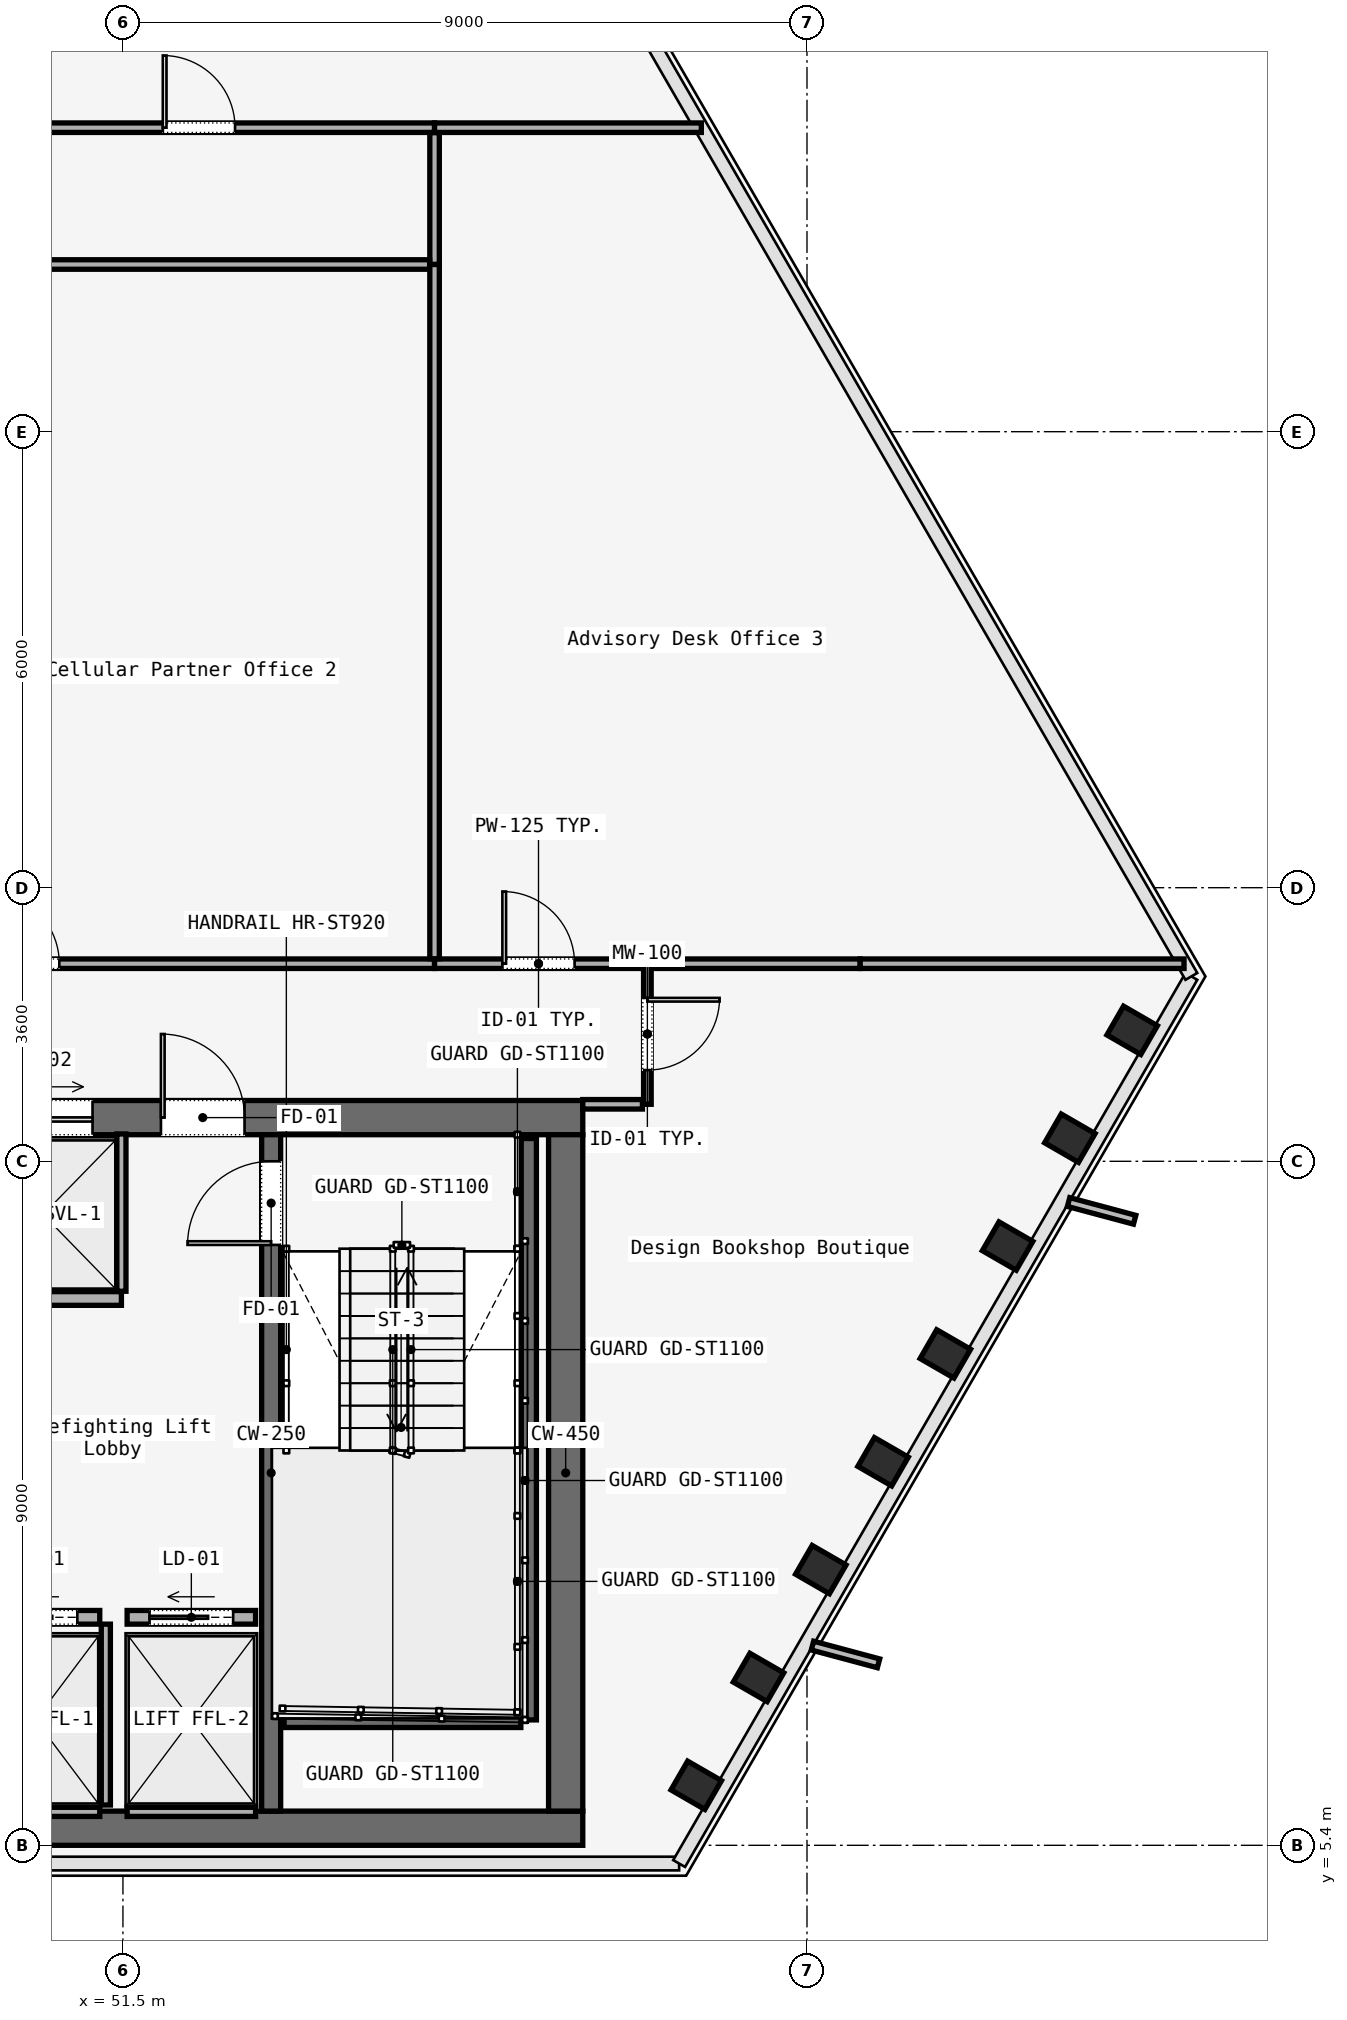
"""IFC4 building model, lengths in metres.
Left out: names, types, materials, properties, quantities, classifications, styles, units other than length and angle.
Written with IfcOpenShell. Run it as: python <this file> out.ifc"""

import sys

from ifc_helpers import new_model, si_unit, direction, frame, frame_2d, origin, origin_2d, place, context, subcontext, project, spatial, rectangle, i_section, extrude, element, fill, save


model = new_model("IFC4")
c1 = context("Model", 3, precision=1e-05, world=origin(), true_north=direction((0.0, 1.0)))
c2 = subcontext(c1, "Body", "Model", "MODEL_VIEW")
j1 = project(units=[si_unit("LENGTHUNIT", "METRE"), si_unit("PLANEANGLEUNIT", "RADIAN")], contexts=[c1])
p1 = place(None, origin())
s1 = spatial("IfcSite", under=j1, at=p1, CompositionType="ELEMENT")
p2 = place(p1, origin())
s2 = spatial("IfcBuilding", under=s1, at=p2, CompositionType="ELEMENT")
p3 = place(p2, frame((0.0, 0.0, 104.4)))
s3 = spatial("IfcBuildingStorey", under=s2, at=p3, CompositionType="ELEMENT", Elevation=104.4)
p4 = place(p3, frame((26.45, 14.975, 0.0), z_axis=(0.0, 0.0, 1.0), x_axis=(1.0, 0.0, 0.0)))
e1 = element("IfcWall", 1, at=p4, inside=s3, PredefinedType="SOLIDWALL", context=c2, shape_type="SweptSolid", body=[
    extrude(rectangle(XDim=31.1, YDim=0.45, at=frame_2d((15.55, 0.0))), origin(), (0.0, 0.0, 1.0), 3.58),
])
p5 = place(p4, frame((1.65, 0.0, 0.0)))
e2 = element("IfcOpeningElement", 2, at=p5, cuts=e1, PredefinedType="OPENING", context=c2, shape_type="SweptSolid", body=[
    extrude(rectangle(XDim=1.1, YDim=2.2, at=frame_2d((0.55, 1.1))), frame((0.0, 0.225, 0.0), z_axis=(0.0, -1.0, 0.0), x_axis=(1.0, 0.0, 0.0)), (0.0, 0.0, 1.0), 0.45),
])
p6 = place(p4, frame((13.65, 0.0, 0.0)))
e3 = element("IfcOpeningElement", 3, at=p6, cuts=e1, PredefinedType="OPENING", context=c2, shape_type="SweptSolid", body=[
    extrude(rectangle(XDim=1.1, YDim=2.2, at=frame_2d((0.55, 1.1))), frame((0.0, 0.225, 0.0), z_axis=(0.0, -1.0, 0.0), x_axis=(1.0, 0.0, 0.0)), (0.0, 0.0, 1.0), 0.45),
])
p7 = place(p4, frame((25.55, 0.0, 0.0)))
e4 = element("IfcOpeningElement", 4, at=p7, cuts=e1, PredefinedType="OPENING", context=c2, shape_type="SweptSolid", body=[
    extrude(rectangle(XDim=1.1, YDim=2.2, at=frame_2d((0.55, 1.1))), frame((0.0, 0.225, 0.0), z_axis=(0.0, -1.0, 0.0), x_axis=(1.0, 0.0, 0.0)), (0.0, 0.0, 1.0), 0.45),
])
p8 = place(p4, frame((10.7, 0.0, 0.0)))
e5 = element("IfcOpeningElement", 5, at=p8, cuts=e1, PredefinedType="OPENING", context=c2, shape_type="SweptSolid", body=[
    extrude(rectangle(XDim=1.4, YDim=2.2, at=frame_2d((0.7, 1.1))), frame((0.0, 0.225, 0.0), z_axis=(0.0, -1.0, 0.0), x_axis=(1.0, 0.0, 0.0)), (0.0, 0.0, 1.0), 0.45),
])
p9 = place(p4, frame((19.35, 0.0, 0.0)))
e6 = element("IfcOpeningElement", 6, at=p9, cuts=e1, PredefinedType="OPENING", context=c2, shape_type="SweptSolid", body=[
    extrude(rectangle(XDim=1.1, YDim=2.2, at=frame_2d((0.55, 1.1))), frame((0.0, 0.225, 0.0), z_axis=(0.0, -1.0, 0.0), x_axis=(1.0, 0.0, 0.0)), (0.0, 0.0, 1.0), 0.45),
])
p10 = place(p4, frame((21.4, 0.0, 0.0)))
e7 = element("IfcOpeningElement", 7, at=p10, cuts=e1, PredefinedType="OPENING", context=c2, shape_type="SweptSolid", body=[
    extrude(rectangle(XDim=0.9, YDim=2.1, at=frame_2d((0.45, 1.05))), frame((0.0, 0.225, 0.0), z_axis=(0.0, -1.0, 0.0), x_axis=(1.0, 0.0, 0.0)), (0.0, 0.0, 1.0), 0.45),
])
p11 = place(p4, frame((23.35, 0.0, 0.0)))
e8 = element("IfcOpeningElement", 8, at=p11, cuts=e1, PredefinedType="OPENING", context=c2, shape_type="SweptSolid", body=[
    extrude(rectangle(XDim=1.3, YDim=2.3, at=frame_2d((0.65, 1.15))), frame((0.0, 0.225, 0.0), z_axis=(0.0, -1.0, 0.0), x_axis=(1.0, 0.0, 0.0)), (0.0, 0.0, 1.0), 0.45),
])
p12 = place(p3, frame((26.45, 5.625, 0.0), z_axis=(0.0, 0.0, 1.0), x_axis=(1.0, 0.0, 0.0)))
e9 = element("IfcWall", 9, at=p12, inside=s3, PredefinedType="SOLIDWALL", context=c2, shape_type="SweptSolid", body=[
    extrude(rectangle(XDim=31.1, YDim=0.45, at=frame_2d((15.55, 0.0))), origin(), (0.0, 0.0, 1.0), 3.58),
])
p13 = place(p3, frame((57.325, 5.85, 0.0), z_axis=(0.0, 0.0, 1.0), x_axis=(0.0, 1.0, 0.0)))
e10 = element("IfcWall", 10, at=p13, inside=s3, PredefinedType="SOLIDWALL", context=c2, shape_type="SweptSolid", body=[
    extrude(rectangle(XDim=8.9, YDim=0.45, at=frame_2d((4.45, 0.0))), origin(), (0.0, 0.0, 1.0), 3.58),
])
p14 = place(p3, frame((53.45, 5.85, 0.0), z_axis=(0.0, 0.0, 1.0), x_axis=(0.0, 1.0, 0.0)))
e11 = element("IfcWall", 11, at=p14, inside=s3, PredefinedType="SOLIDWALL", context=c2, shape_type="SweptSolid", body=[
    extrude(rectangle(XDim=8.9, YDim=0.25, at=frame_2d((4.45, 0.0))), origin(), (0.0, 0.0, 1.0), 3.58),
])
p15 = place(p14, frame((7.45, 0.0, 0.0)))
e12 = element("IfcOpeningElement", 12, at=p15, cuts=e11, PredefinedType="OPENING", context=c2, shape_type="SweptSolid", body=[
    extrude(rectangle(XDim=1.1, YDim=2.2, at=frame_2d((0.55, 1.1))), frame((0.0, 0.125, 0.0), z_axis=(0.0, -1.0, 0.0), x_axis=(1.0, 0.0, 0.0)), (0.0, 0.0, 1.0), 0.25),
])
for number, where, z_axis, x_axis in (
    (13, (59.043, 6.19, 0.0), (0.0, 0.0, 1.0), (0.5, 0.866, 0.0)),
    (14, (59.862, 7.609, 0.0), (0.0, 0.0, 1.0), (0.5, 0.866, 0.0)),
    (15, (60.682, 9.028, 0.0), (0.0, 0.0, 1.0), (0.5, 0.866, 0.0)),
    (16, (61.501, 10.447, 0.0), (0.0, 0.0, 1.0), (0.5, 0.866, 0.0)),
    (17, (62.32, 11.866, 0.0), (0.0, 0.0, 1.0), (0.5, 0.866, 0.0)),
    (18, (63.139, 13.285, 0.0), (0.0, 0.0, 1.0), (0.5, 0.866, 0.0)),
    (19, (63.959, 14.704, 0.0), (0.0, 0.0, 1.0), (0.5, 0.866, 0.0)),
    (20, (64.778, 16.123, 0.0), (0.0, 0.0, 1.0), (0.5, 0.866, 0.0)),
):
    element("IfcColumn", number, at=place(p3, frame(where, z_axis=z_axis, x_axis=x_axis)), inside=s3, PredefinedType="COLUMN", context=c2, shape_type="SweptSolid", body=[
        extrude(i_section(OverallWidth=0.437, OverallDepth=0.514, WebThickness=0.061, FlangeThickness=0.077, FilletRadius=0.015, at=origin_2d()), origin(), (0.0, 0.0, 1.0), 3.58),
    ])
p16 = place(p3, frame((56.84, 14.7, 0.0), z_axis=(0.0, 0.0, 1.0), x_axis=(0.0, -1.0, 0.0)))
e21 = element("IfcWall", 21, at=p16, inside=s3, PredefinedType="SOLIDWALL", context=c2, shape_type="SweptSolid", body=[
    extrude(rectangle(XDim=7.65, YDim=0.2, at=frame_2d((3.825, 0.0))), origin(), (0.0, 0.0, 1.0), 3.8),
])
p17 = place(p3, frame((53.62, 7.05, 0.0), z_axis=(0.0, 0.0, 1.0), x_axis=(1.0, 0.0, 0.0)))
e22 = element("IfcWall", 22, at=p17, inside=s3, PredefinedType="SOLIDWALL", context=c2, shape_type="SweptSolid", body=[
    extrude(rectangle(XDim=3.115, YDim=0.2, at=frame_2d((1.558, 0.0))), origin(), (0.0, 0.0, 1.0), 3.8),
])
p18 = place(p3, frame((49.505, 8.4, 0.0), z_axis=(0.0, 0.0, 1.0), x_axis=(1.0, 0.0, 0.0)))
e23 = element("IfcWall", 23, at=p18, inside=s3, PredefinedType="SOLIDWALL", context=c2, shape_type="SweptSolid", body=[
    extrude(rectangle(XDim=1.69, YDim=0.18, at=frame_2d((0.845, 0.0))), origin(), (0.0, 0.0, 1.0), 2.95),
])
p19 = place(p18, frame((0.295, 0.0, 0.0)))
e24 = element("IfcOpeningElement", 24, at=p19, cuts=e23, PredefinedType="OPENING", context=c2, shape_type="SweptSolid", body=[
    extrude(rectangle(XDim=1.1, YDim=2.2, at=frame_2d((0.55, 1.1))), frame((0.0, 0.09, 0.0), z_axis=(0.0, -1.0, 0.0), x_axis=(1.0, 0.0, 0.0)), (0.0, 0.0, 1.0), 0.18),
])
p20 = place(p3, frame((49.505, 5.84, 0.0), z_axis=(0.0, 0.0, 1.0), x_axis=(1.0, 0.0, 0.0)))
e25 = element("IfcWall", 25, at=p20, inside=s3, PredefinedType="SOLIDWALL", context=c2, shape_type="SweptSolid", body=[
    extrude(rectangle(XDim=1.69, YDim=0.12, at=frame_2d((0.845, 0.0))), origin(), (0.0, 0.0, 1.0), 2.95),
])
p21 = place(p3, frame((51.275, 5.93, 0.0), z_axis=(0.0, 0.0, 1.0), x_axis=(0.0, 1.0, 0.0)))
e26 = element("IfcWall", 26, at=p21, inside=s3, PredefinedType="SOLIDWALL", context=c2, shape_type="SweptSolid", body=[
    extrude(rectangle(XDim=2.38, YDim=0.12, at=frame_2d((1.19, 0.0))), origin(), (0.0, 0.0, 1.0), 2.95),
])
p22 = place(p3, frame((51.555, 8.4, 0.0), z_axis=(0.0, 0.0, 1.0), x_axis=(1.0, 0.0, 0.0)))
e27 = element("IfcWall", 27, at=p22, inside=s3, PredefinedType="SOLIDWALL", context=c2, shape_type="SweptSolid", body=[
    extrude(rectangle(XDim=1.69, YDim=0.18, at=frame_2d((0.845, 0.0))), origin(), (0.0, 0.0, 1.0), 2.95),
])
p23 = place(p22, frame((0.295, 0.0, 0.0)))
e28 = element("IfcOpeningElement", 28, at=p23, cuts=e27, PredefinedType="OPENING", context=c2, shape_type="SweptSolid", body=[
    extrude(rectangle(XDim=1.1, YDim=2.2, at=frame_2d((0.55, 1.1))), frame((0.0, 0.09, 0.0), z_axis=(0.0, -1.0, 0.0), x_axis=(1.0, 0.0, 0.0)), (0.0, 0.0, 1.0), 0.18),
])
p24 = place(p3, frame((51.555, 5.84, 0.0), z_axis=(0.0, 0.0, 1.0), x_axis=(1.0, 0.0, 0.0)))
e29 = element("IfcWall", 29, at=p24, inside=s3, PredefinedType="SOLIDWALL", context=c2, shape_type="SweptSolid", body=[
    extrude(rectangle(XDim=1.69, YDim=0.12, at=frame_2d((0.845, 0.0))), origin(), (0.0, 0.0, 1.0), 2.95),
])
p25 = place(p3, frame((49.44, 12.595, 0.0), z_axis=(0.0, 0.0, 1.0), x_axis=(1.0, 0.0, 0.0)))
e30 = element("IfcWall", 30, at=p25, inside=s3, PredefinedType="SOLIDWALL", context=c2, shape_type="SweptSolid", body=[
    extrude(rectangle(XDim=2.04, YDim=0.18, at=frame_2d((1.02, 0.0))), origin(), (0.0, 0.0, 1.0), 2.95),
])
p26 = place(p3, frame((51.48, 12.69, 0.0), z_axis=(0.0, 0.0, 1.0), x_axis=(0.0, 1.0, 0.0)))
e31 = element("IfcWall", 31, at=p26, inside=s3, PredefinedType="SOLIDWALL", context=c2, shape_type="SweptSolid", body=[
    extrude(rectangle(XDim=2.07, YDim=0.12, at=frame_2d((1.035, 0.0))), origin(), (0.0, 0.0, 1.0), 2.95),
])
p27 = place(p3, frame((58.4, 17.0, 0.0), z_axis=(0.0, 0.0, 1.0), x_axis=(0.0, -1.0, 0.0)))
e32 = element("IfcWall", 32, at=p27, inside=s3, PredefinedType="MOVABLE", context=c2, shape_type="SweptSolid", body=[
    extrude(rectangle(XDim=1.85, YDim=0.1, at=frame_2d((0.925, 0.0))), origin(), (0.0, 0.0, 1.0), 2.95),
])
p28 = place(p27, frame((0.45, 0.0, 0.0)))
e33 = element("IfcOpeningElement", 33, at=p28, cuts=e32, PredefinedType="OPENING", context=c2, shape_type="SweptSolid", body=[
    extrude(rectangle(XDim=0.95, YDim=2.2, at=frame_2d((0.475, 1.1))), frame((0.0, 0.05, 0.0), z_axis=(0.0, -1.0, 0.0), x_axis=(1.0, 0.0, 0.0)), (0.0, 0.0, 1.0), 0.1),
])
p29 = place(p3, frame((58.335, 15.15, 0.0), z_axis=(0.0, 0.0, 1.0), x_axis=(-1.0, 0.0, 0.0)))
e34 = element("IfcWall", 34, at=p29, inside=s3, PredefinedType="PARTITIONING", context=c2, shape_type="SweptSolid", body=[
    extrude(rectangle(XDim=0.785, YDim=0.125, at=frame_2d((0.393, 0.0))), origin(), (0.0, 0.0, 1.0), 2.95),
])
p30 = place(p3, frame((49.4, 28.0, 0.0), z_axis=(0.0, 0.0, 1.0), x_axis=(1.0, 0.0, 0.0)))
e35 = element("IfcWall", 35, at=p30, inside=s3, PredefinedType="PARTITIONING", context=c2, shape_type="SweptSolid", body=[
    extrude(rectangle(XDim=6.2, YDim=0.125, at=frame_2d((3.1, 0.0))), origin(), (0.0, 0.0, 1.0), 2.95),
])
p31 = place(p30, frame((2.625, 0.0, 0.0)))
e36 = element("IfcOpeningElement", 36, at=p31, cuts=e35, PredefinedType="OPENING", context=c2, shape_type="SweptSolid", body=[
    extrude(rectangle(XDim=0.95, YDim=2.2, at=frame_2d((0.475, 1.1))), frame((0.0, 0.062, 0.0), z_axis=(0.0, -1.0, 0.0), x_axis=(1.0, 0.0, 0.0)), (0.0, 0.0, 1.0), 0.125),
])
p32 = place(p3, frame((55.6, 27.935, 0.0), z_axis=(0.0, 0.0, 1.0), x_axis=(0.0, -1.0, 0.0)))
e37 = element("IfcWall", 37, at=p32, inside=s3, PredefinedType="PARTITIONING", context=c2, shape_type="SweptSolid", body=[
    extrude(rectangle(XDim=1.735, YDim=0.125, at=frame_2d((0.868, 0.0))), origin(), (0.0, 0.0, 1.0), 2.95),
])
p33 = place(p3, frame((55.535, 26.2, 0.0), z_axis=(0.0, 0.0, 1.0), x_axis=(-1.0, 0.0, 0.0)))
e38 = element("IfcWall", 38, at=p33, inside=s3, PredefinedType="PARTITIONING", context=c2, shape_type="SweptSolid", body=[
    extrude(rectangle(XDim=10.759, YDim=0.125, at=frame_2d((5.379, 0.0))), origin(), (0.0, 0.0, 1.0), 2.95),
])
p34 = place(p3, frame((44.776, 17.0, 0.0), z_axis=(0.0, 0.0, 1.0), x_axis=(1.0, 0.0, 0.0)))
e39 = element("IfcWall", 39, at=p34, inside=s3, PredefinedType="PARTITIONING", context=c2, shape_type="SweptSolid", body=[
    extrude(rectangle(XDim=10.824, YDim=0.125, at=frame_2d((5.412, 0.0))), origin(), (0.0, 0.0, 1.0), 2.95),
])
p35 = place(p34, frame((4.937, 0.0, 0.0)))
e40 = element("IfcOpeningElement", 40, at=p35, cuts=e39, PredefinedType="OPENING", context=c2, shape_type="SweptSolid", body=[
    extrude(rectangle(XDim=0.95, YDim=2.2, at=frame_2d((0.475, 1.1))), frame((0.0, 0.062, 0.0), z_axis=(0.0, -1.0, 0.0), x_axis=(1.0, 0.0, 0.0)), (0.0, 0.0, 1.0), 0.125),
])
p36 = place(p3, frame((55.6, 17.0, 0.0), z_axis=(0.0, 0.0, 1.0), x_axis=(1.0, 0.0, 0.0)))
e41 = element("IfcWall", 41, at=p36, inside=s3, PredefinedType="PARTITIONING", context=c2, shape_type="SweptSolid", body=[
    extrude(rectangle(XDim=2.735, YDim=0.125, at=frame_2d((1.367, 0.0))), origin(), (0.0, 0.0, 1.0), 2.95),
])
p37 = place(p36, frame((0.893, 0.0, 0.0)))
e42 = element("IfcOpeningElement", 42, at=p37, cuts=e41, PredefinedType="OPENING", context=c2, shape_type="SweptSolid", body=[
    extrude(rectangle(XDim=0.95, YDim=2.2, at=frame_2d((0.475, 1.1))), frame((0.0, 0.062, 0.0), z_axis=(0.0, -1.0, 0.0), x_axis=(1.0, 0.0, 0.0)), (0.0, 0.0, 1.0), 0.125),
])
p38 = place(p3, frame((58.465, 17.0, 0.0), z_axis=(0.0, 0.0, 1.0), x_axis=(1.0, 0.0, 0.0)))
e43 = element("IfcWall", 43, at=p38, inside=s3, PredefinedType="PARTITIONING", context=c2, shape_type="SweptSolid", body=[
    extrude(rectangle(XDim=2.735, YDim=0.125, at=frame_2d((1.367, 0.0))), origin(), (0.0, 0.0, 1.0), 2.95),
])
p39 = place(p3, frame((61.2, 17.0, 0.0), z_axis=(0.0, 0.0, 1.0), x_axis=(1.0, 0.0, 0.0)))
e44 = element("IfcWall", 44, at=p39, inside=s3, PredefinedType="PARTITIONING", context=c2, shape_type="SweptSolid", body=[
    extrude(rectangle(XDim=4.261, YDim=0.125, at=frame_2d((2.13, 0.0))), origin(), (0.0, 0.0, 1.0), 2.95),
])
p40 = place(p3, frame((55.6, 26.2, 0.0), z_axis=(0.0, 0.0, 1.0), x_axis=(0.0, -1.0, 0.0)))
e45 = element("IfcWall", 45, at=p40, inside=s3, PredefinedType="PARTITIONING", context=c2, shape_type="SweptSolid", body=[
    extrude(rectangle(XDim=9.135, YDim=0.125, at=frame_2d((4.567, 0.0))), origin(), (0.0, 0.0, 1.0), 2.95),
])
p41 = place(p3, frame((55.6, 28.0, 0.0), z_axis=(0.0, 0.0, 1.0), x_axis=(1.0, 0.0, 0.0)))
e46 = element("IfcWall", 46, at=p41, inside=s3, PredefinedType="PARTITIONING", context=c2, shape_type="SweptSolid", body=[
    extrude(rectangle(XDim=3.51, YDim=0.125, at=frame_2d((1.755, 0.0))), origin(), (0.0, 0.0, 1.0), 2.95),
])
p42 = place(p7, origin())
e47 = element("IfcDoor", 47, at=p42, inside=s3, OperationType="SINGLE_SWING_RIGHT", PredefinedType="DOOR", context=c2, shape_type="SweptSolid", body=[
    extrude(rectangle(XDim=1.1, YDim=2.2, at=frame_2d((0.55, 1.1))), frame((0.0, 0.025, 0.0), z_axis=(0.0, -1.0, 0.0), x_axis=(1.0, 0.0, 0.0)), (0.0, 0.0, 1.0), 0.05),
])
fill(e4, e47)
p43 = place(p15, origin())
e48 = element("IfcDoor", 48, at=p43, inside=s3, OperationType="SINGLE_SWING_LEFT", PredefinedType="DOOR", context=c2, shape_type="SweptSolid", body=[
    extrude(rectangle(XDim=1.1, YDim=2.2, at=frame_2d((0.55, 1.1))), frame((0.0, 0.025, 0.0), z_axis=(0.0, -1.0, 0.0), x_axis=(1.0, 0.0, 0.0)), (0.0, 0.0, 1.0), 0.05),
])
fill(e12, e48)
p44 = place(p19, origin())
e49 = element("IfcDoor", 49, at=p44, inside=s3, OperationType="SLIDING_TO_LEFT", PredefinedType="DOOR", context=c2, shape_type="SweptSolid", body=[
    extrude(rectangle(XDim=1.1, YDim=2.2, at=frame_2d((0.55, 1.1))), frame((0.0, 0.025, 0.0), z_axis=(0.0, -1.0, 0.0), x_axis=(1.0, 0.0, 0.0)), (0.0, 0.0, 1.0), 0.05),
])
fill(e24, e49)
p45 = place(p23, origin())
e50 = element("IfcDoor", 50, at=p45, inside=s3, OperationType="SLIDING_TO_LEFT", PredefinedType="DOOR", context=c2, shape_type="SweptSolid", body=[
    extrude(rectangle(XDim=1.1, YDim=2.2, at=frame_2d((0.55, 1.1))), frame((0.0, 0.025, 0.0), z_axis=(0.0, -1.0, 0.0), x_axis=(1.0, 0.0, 0.0)), (0.0, 0.0, 1.0), 0.05),
])
fill(e28, e50)
p46 = place(p11, origin())
e51 = element("IfcDoor", 51, at=p46, inside=s3, OperationType="DOUBLE_DOOR_SLIDING", PredefinedType="DOOR", context=c2, shape_type="SweptSolid", body=[
    extrude(rectangle(XDim=1.3, YDim=2.3, at=frame_2d((0.65, 1.15))), frame((0.0, 0.025, 0.0), z_axis=(0.0, -1.0, 0.0), x_axis=(1.0, 0.0, 0.0)), (0.0, 0.0, 1.0), 0.05),
])
fill(e8, e51)
p47 = place(p28, origin())
e52 = element("IfcDoor", 52, at=p47, inside=s3, OperationType="SINGLE_SWING_RIGHT", PredefinedType="DOOR", context=c2, shape_type="SweptSolid", body=[
    extrude(rectangle(XDim=0.95, YDim=2.2, at=frame_2d((0.475, 1.1))), frame((0.0, 0.025, 0.0), z_axis=(0.0, -1.0, 0.0), x_axis=(1.0, 0.0, 0.0)), (0.0, 0.0, 1.0), 0.05),
])
fill(e33, e52)
p48 = place(p35, origin())
e53 = element("IfcDoor", 53, at=p48, inside=s3, OperationType="SINGLE_SWING_RIGHT", PredefinedType="DOOR", context=c2, shape_type="SweptSolid", body=[
    extrude(rectangle(XDim=0.95, YDim=2.2, at=frame_2d((0.475, 1.1))), frame((0.0, 0.025, 0.0), z_axis=(0.0, -1.0, 0.0), x_axis=(1.0, 0.0, 0.0)), (0.0, 0.0, 1.0), 0.05),
])
fill(e40, e53)
p49 = place(p37, origin())
e54 = element("IfcDoor", 54, at=p49, inside=s3, OperationType="SINGLE_SWING_LEFT", PredefinedType="DOOR", context=c2, shape_type="SweptSolid", body=[
    extrude(rectangle(XDim=0.95, YDim=2.2, at=frame_2d((0.475, 1.1))), frame((0.0, 0.025, 0.0), z_axis=(0.0, -1.0, 0.0), x_axis=(1.0, 0.0, 0.0)), (0.0, 0.0, 1.0), 0.05),
])
fill(e42, e54)
p50 = place(p31, origin())
e55 = element("IfcDoor", 55, at=p50, inside=s3, OperationType="SINGLE_SWING_LEFT", PredefinedType="DOOR", context=c2, shape_type="SweptSolid", body=[
    extrude(rectangle(XDim=0.95, YDim=2.2, at=frame_2d((0.475, 1.1))), frame((0.0, 0.025, 0.0), z_axis=(0.0, -1.0, 0.0), x_axis=(1.0, 0.0, 0.0)), (0.0, 0.0, 1.0), 0.05),
])
fill(e36, e55)
save(model, sys.argv[1])
